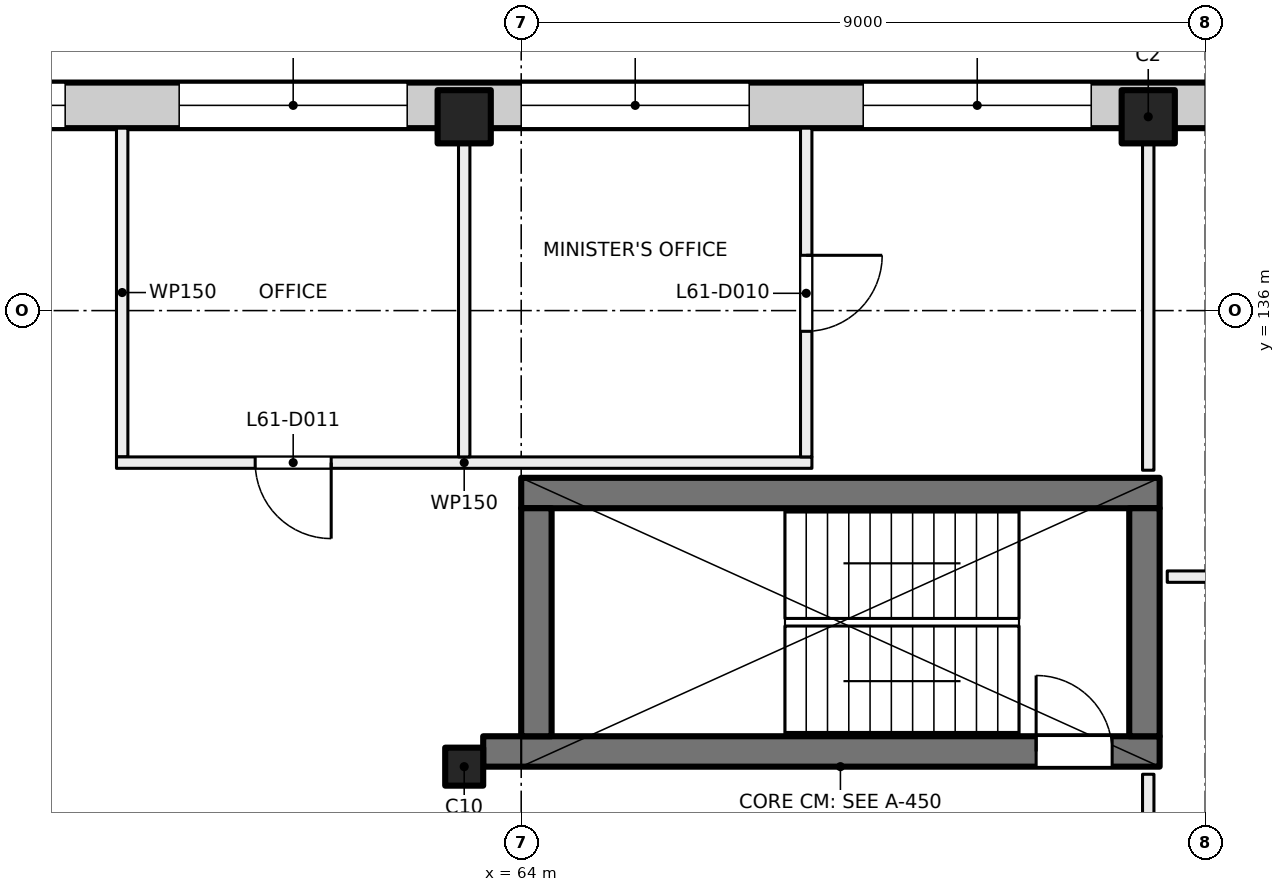
"""IFC4 building model, lengths in metres.
Left out: names, types, materials, properties, quantities, classifications, styles, units other than length and angle.
Written with IfcOpenShell. Run it as: python <this file> out.ifc"""

import sys

from ifc_helpers import new_model, si_unit, direction, frame, frame_2d, origin, origin_2d, place, context, subcontext, project, spatial, rectangle, extrude, element, fill, save


model = new_model("IFC4")
c1 = context("Model", 3, precision=1e-05, world=origin(), true_north=direction((0.0, 1.0)))
c2 = subcontext(c1, "Body", "Model", "MODEL_VIEW")
j1 = project(units=[si_unit("LENGTHUNIT", "METRE"), si_unit("PLANEANGLEUNIT", "RADIAN")], contexts=[c1])
p1 = place(None, origin())
s1 = spatial("IfcSite", under=j1, at=p1, CompositionType="ELEMENT")
p2 = place(p1, origin())
s2 = spatial("IfcBuilding", under=s1, at=p2, CompositionType="ELEMENT")
p3 = place(p2, frame((0.0, 0.0, 257.5)))
s3 = spatial("IfcBuildingStorey", under=s2, at=p3, CompositionType="ELEMENT", Elevation=257.5)
p4 = place(p3, frame((63.25, 130.0, 0.0), z_axis=(0.0, 0.0, 1.0), x_axis=(1.0, 0.0, 0.0)))
e1 = element("IfcColumn", 1, at=p4, inside=s3, PredefinedType="COLUMN", context=c2, shape_type="SweptSolid", body=[
    extrude(rectangle(XDim=0.5, YDim=0.5, at=origin_2d()), origin(), (0.0, 0.0, 1.0), 4.0),
])
for number, where, z_axis, x_axis in (
    (2, (63.25, 138.55, 0.0), (0.0, 0.0, 1.0), (1.0, 0.0, 0.0)),
    (3, (72.25, 138.55, 0.0), (0.0, 0.0, 1.0), (1.0, 0.0, 0.0)),
):
    element("IfcColumn", number, at=place(p3, frame(where, z_axis=z_axis, x_axis=x_axis)), inside=s3, PredefinedType="COLUMN", context=c2, shape_type="SweptSolid", body=[
        extrude(rectangle(XDim=0.7, YDim=0.7, at=origin_2d()), origin(), (0.0, 0.0, 1.0), 4.0),
    ])
p5 = place(p3, frame((63.5, 130.2, 0.0), z_axis=(0.0, 0.0, 1.0), x_axis=(1.0, 0.0, 0.0)))
e4 = element("IfcWall", 4, at=p5, inside=s3, PredefinedType="SHEAR", context=c2, shape_type="SweptSolid", body=[
    extrude(rectangle(XDim=8.9, YDim=0.4, at=frame_2d((4.45, 0.0))), origin(), (0.0, 0.0, 1.0), 4.0),
])
p6 = place(p5, frame((7.275, 0.0, 0.0)))
e5 = element("IfcOpeningElement", 5, at=p6, cuts=e4, PredefinedType="OPENING", context=c2, shape_type="SweptSolid", body=[
    extrude(rectangle(XDim=1.0, YDim=2.1, at=frame_2d((0.5, 1.05))), frame((0.0, 0.21, 0.0), z_axis=(0.0, -1.0, 0.0), x_axis=(1.0, 0.0, 0.0)), (0.0, 0.0, 1.0), 0.42),
])
p7 = place(p3, frame((64.0, 133.6, 0.0), z_axis=(0.0, 0.0, 1.0), x_axis=(1.0, 0.0, 0.0)))
e6 = element("IfcWall", 6, at=p7, inside=s3, PredefinedType="SHEAR", context=c2, shape_type="SweptSolid", body=[
    extrude(rectangle(XDim=8.4, YDim=0.4, at=frame_2d((4.2, 0.0))), origin(), (0.0, 0.0, 1.0), 4.0),
])
for number, where, z_axis, x_axis in (
    (7, (64.2, 130.4, 0.0), (0.0, 0.0, 1.0), (0.0, 1.0, 0.0)),
    (8, (72.2, 130.4, 0.0), (0.0, 0.0, 1.0), (0.0, 1.0, 0.0)),
):
    element("IfcWall", number, at=place(p3, frame(where, z_axis=z_axis, x_axis=x_axis)), inside=s3, PredefinedType="SHEAR", context=c2, shape_type="SweptSolid", body=[
        extrude(rectangle(XDim=3.0, YDim=0.4, at=frame_2d((1.5, 0.0))), origin(), (0.0, 0.0, 1.0), 4.0),
    ])
p8 = place(p3, frame((47.07, 138.7, 0.0), z_axis=(0.0, 0.0, 1.0), x_axis=(1.0, 0.0, 0.0)))
e9 = element("IfcWall", 9, at=p8, inside=s3, PredefinedType="SOLIDWALL", context=c2, shape_type="SweptSolid", body=[
    extrude(rectangle(XDim=43.91, YDim=0.6, at=frame_2d((21.955, 0.0))), origin(), (0.0, 0.0, 1.0), 3.625),
])
p9 = place(p8, frame((3.43, 0.0, 0.9)))
e10 = element("IfcOpeningElement", 10, at=p9, cuts=e9, PredefinedType="OPENING", context=c2, shape_type="SweptSolid", body=[
    extrude(rectangle(XDim=3.0, YDim=2.4, at=frame_2d((1.5, 1.2))), frame((0.0, 0.31, 0.0), z_axis=(0.0, -1.0, 0.0), x_axis=(1.0, 0.0, 0.0)), (0.0, 0.0, 1.0), 0.62),
])
p10 = place(p8, frame((7.93, 0.0, 0.9)))
e11 = element("IfcOpeningElement", 11, at=p10, cuts=e9, PredefinedType="OPENING", context=c2, shape_type="SweptSolid", body=[
    extrude(rectangle(XDim=3.0, YDim=2.4, at=frame_2d((1.5, 1.2))), frame((0.0, 0.31, 0.0), z_axis=(0.0, -1.0, 0.0), x_axis=(1.0, 0.0, 0.0)), (0.0, 0.0, 1.0), 0.62),
])
p11 = place(p8, frame((12.43, 0.0, 0.9)))
e12 = element("IfcOpeningElement", 12, at=p11, cuts=e9, PredefinedType="OPENING", context=c2, shape_type="SweptSolid", body=[
    extrude(rectangle(XDim=3.0, YDim=2.4, at=frame_2d((1.5, 1.2))), frame((0.0, 0.31, 0.0), z_axis=(0.0, -1.0, 0.0), x_axis=(1.0, 0.0, 0.0)), (0.0, 0.0, 1.0), 0.62),
])
p12 = place(p8, frame((16.93, 0.0, 0.9)))
e13 = element("IfcOpeningElement", 13, at=p12, cuts=e9, PredefinedType="OPENING", context=c2, shape_type="SweptSolid", body=[
    extrude(rectangle(XDim=3.0, YDim=2.4, at=frame_2d((1.5, 1.2))), frame((0.0, 0.31, 0.0), z_axis=(0.0, -1.0, 0.0), x_axis=(1.0, 0.0, 0.0)), (0.0, 0.0, 1.0), 0.62),
])
p13 = place(p8, frame((21.43, 0.0, 0.9)))
e14 = element("IfcOpeningElement", 14, at=p13, cuts=e9, PredefinedType="OPENING", context=c2, shape_type="SweptSolid", body=[
    extrude(rectangle(XDim=3.0, YDim=2.4, at=frame_2d((1.5, 1.2))), frame((0.0, 0.31, 0.0), z_axis=(0.0, -1.0, 0.0), x_axis=(1.0, 0.0, 0.0)), (0.0, 0.0, 1.0), 0.62),
])
p14 = place(p8, frame((25.93, 0.0, 0.9)))
e15 = element("IfcOpeningElement", 15, at=p14, cuts=e9, PredefinedType="OPENING", context=c2, shape_type="SweptSolid", body=[
    extrude(rectangle(XDim=3.0, YDim=2.4, at=frame_2d((1.5, 1.2))), frame((0.0, 0.31, 0.0), z_axis=(0.0, -1.0, 0.0), x_axis=(1.0, 0.0, 0.0)), (0.0, 0.0, 1.0), 0.62),
])
p15 = place(p8, frame((30.43, 0.0, 0.9)))
e16 = element("IfcOpeningElement", 16, at=p15, cuts=e9, PredefinedType="OPENING", context=c2, shape_type="SweptSolid", body=[
    extrude(rectangle(XDim=3.0, YDim=2.4, at=frame_2d((1.5, 1.2))), frame((0.0, 0.31, 0.0), z_axis=(0.0, -1.0, 0.0), x_axis=(1.0, 0.0, 0.0)), (0.0, 0.0, 1.0), 0.62),
])
p16 = place(p8, frame((34.93, 0.0, 0.9)))
e17 = element("IfcOpeningElement", 17, at=p16, cuts=e9, PredefinedType="OPENING", context=c2, shape_type="SweptSolid", body=[
    extrude(rectangle(XDim=3.0, YDim=2.4, at=frame_2d((1.5, 1.2))), frame((0.0, 0.31, 0.0), z_axis=(0.0, -1.0, 0.0), x_axis=(1.0, 0.0, 0.0)), (0.0, 0.0, 1.0), 0.62),
])
p17 = place(p8, frame((39.43, 0.0, 0.9)))
e18 = element("IfcOpeningElement", 18, at=p17, cuts=e9, PredefinedType="OPENING", context=c2, shape_type="SweptSolid", body=[
    extrude(rectangle(XDim=3.0, YDim=2.4, at=frame_2d((1.5, 1.2))), frame((0.0, 0.31, 0.0), z_axis=(0.0, -1.0, 0.0), x_axis=(1.0, 0.0, 0.0)), (0.0, 0.0, 1.0), 0.62),
])
p18 = place(p3, frame((58.75, 134.075, 0.0), z_axis=(0.0, 0.0, 1.0), x_axis=(0.0, 1.0, 0.0)))
e19 = element("IfcWall", 19, at=p18, inside=s3, PredefinedType="PARTITIONING", context=c2, shape_type="SweptSolid", body=[
    extrude(rectangle(XDim=4.325, YDim=0.15, at=frame_2d((2.163, 0.0))), origin(), (0.0, 0.0, 1.0), 3.625),
])
p19 = place(p3, frame((67.825, 134.0, 0.0), z_axis=(0.0, 0.0, 1.0), x_axis=(-1.0, 0.0, 0.0)))
e20 = element("IfcWall", 20, at=p19, inside=s3, PredefinedType="PARTITIONING", context=c2, shape_type="SweptSolid", body=[
    extrude(rectangle(XDim=9.15, YDim=0.15, at=frame_2d((4.575, 0.0))), origin(), (0.0, 0.0, 1.0), 3.625),
])
p20 = place(p19, frame((6.325, 0.0, 0.0)))
e21 = element("IfcOpeningElement", 21, at=p20, cuts=e20, PredefinedType="OPENING", context=c2, shape_type="SweptSolid", body=[
    extrude(rectangle(XDim=1.0, YDim=2.1, at=frame_2d((0.5, 1.05))), frame((0.0, 0.085, 0.0), z_axis=(0.0, -1.0, 0.0), x_axis=(1.0, 0.0, 0.0)), (0.0, 0.0, 1.0), 0.17),
])
p21 = place(p3, frame((63.25, 134.075, 0.0), z_axis=(0.0, 0.0, 1.0), x_axis=(0.0, 1.0, 0.0)))
e22 = element("IfcWall", 22, at=p21, inside=s3, PredefinedType="PARTITIONING", context=c2, shape_type="SweptSolid", body=[
    extrude(rectangle(XDim=4.325, YDim=0.15, at=frame_2d((2.163, 0.0))), origin(), (0.0, 0.0, 1.0), 3.625),
])
p22 = place(p3, frame((67.75, 138.4, 0.0), z_axis=(0.0, 0.0, 1.0), x_axis=(0.0, -1.0, 0.0)))
e23 = element("IfcWall", 23, at=p22, inside=s3, PredefinedType="PARTITIONING", context=c2, shape_type="SweptSolid", body=[
    extrude(rectangle(XDim=4.325, YDim=0.15, at=frame_2d((2.163, 0.0))), origin(), (0.0, 0.0, 1.0), 3.625),
])
p23 = place(p22, frame((1.673, 0.0, 0.0)))
e24 = element("IfcOpeningElement", 24, at=p23, cuts=e23, PredefinedType="OPENING", context=c2, shape_type="SweptSolid", body=[
    extrude(rectangle(XDim=1.0, YDim=2.1, at=frame_2d((0.5, 1.05))), frame((0.0, 0.085, 0.0), z_axis=(0.0, -1.0, 0.0), x_axis=(1.0, 0.0, 0.0)), (0.0, 0.0, 1.0), 0.17),
])
p24 = place(p3, frame((72.25, 126.0, 0.0), z_axis=(0.0, 0.0, 1.0), x_axis=(0.0, 1.0, 0.0)))
e25 = element("IfcWall", 25, at=p24, inside=s3, PredefinedType="PARTITIONING", context=c2, shape_type="SweptSolid", body=[
    extrude(rectangle(XDim=3.9, YDim=0.15, at=frame_2d((1.95, 0.0))), origin(), (0.0, 0.0, 1.0), 3.625),
])
p25 = place(p3, frame((72.25, 133.9, 0.0), z_axis=(0.0, 0.0, 1.0), x_axis=(0.0, 1.0, 0.0)))
e26 = element("IfcWall", 26, at=p25, inside=s3, PredefinedType="PARTITIONING", context=c2, shape_type="SweptSolid", body=[
    extrude(rectangle(XDim=4.5, YDim=0.15, at=frame_2d((2.25, 0.0))), origin(), (0.0, 0.0, 1.0), 3.625),
])
p26 = place(p3, frame((81.325, 132.5, 0.0), z_axis=(0.0, 0.0, 1.0), x_axis=(-1.0, 0.0, 0.0)))
e27 = element("IfcWall", 27, at=p26, inside=s3, PredefinedType="PARTITIONING", context=c2, shape_type="SweptSolid", body=[
    extrude(rectangle(XDim=8.825, YDim=0.15, at=frame_2d((4.413, 0.0))), origin(), (0.0, 0.0, 1.0), 3.625),
])
p27 = place(p26, frame((6.2, 0.0, 0.0)))
e28 = element("IfcOpeningElement", 28, at=p27, cuts=e27, PredefinedType="OPENING", context=c2, shape_type="SweptSolid", body=[
    extrude(rectangle(XDim=1.0, YDim=2.1, at=frame_2d((0.5, 1.05))), frame((0.0, 0.085, 0.0), z_axis=(0.0, -1.0, 0.0), x_axis=(1.0, 0.0, 0.0)), (0.0, 0.0, 1.0), 0.17),
])
p28 = place(p10, origin())
e29 = element("IfcWindow", 29, at=p28, inside=s3, PartitioningType="SINGLE_PANEL", PredefinedType="WINDOW", context=c2, shape_type="SweptSolid", body=[
    extrude(rectangle(XDim=3.0, YDim=2.4, at=frame_2d((1.5, 1.2))), frame((0.0, 0.03, 0.0), z_axis=(0.0, -1.0, 0.0), x_axis=(1.0, 0.0, 0.0)), (0.0, 0.0, 1.0), 0.06),
])
fill(e11, e29)
p29 = place(p11, origin())
e30 = element("IfcWindow", 30, at=p29, inside=s3, PartitioningType="SINGLE_PANEL", PredefinedType="WINDOW", context=c2, shape_type="SweptSolid", body=[
    extrude(rectangle(XDim=3.0, YDim=2.4, at=frame_2d((1.5, 1.2))), frame((0.0, 0.03, 0.0), z_axis=(0.0, -1.0, 0.0), x_axis=(1.0, 0.0, 0.0)), (0.0, 0.0, 1.0), 0.06),
])
fill(e12, e30)
p30 = place(p12, origin())
e31 = element("IfcWindow", 31, at=p30, inside=s3, PartitioningType="SINGLE_PANEL", PredefinedType="WINDOW", context=c2, shape_type="SweptSolid", body=[
    extrude(rectangle(XDim=3.0, YDim=2.4, at=frame_2d((1.5, 1.2))), frame((0.0, 0.03, 0.0), z_axis=(0.0, -1.0, 0.0), x_axis=(1.0, 0.0, 0.0)), (0.0, 0.0, 1.0), 0.06),
])
fill(e13, e31)
p31 = place(p13, origin())
e32 = element("IfcWindow", 32, at=p31, inside=s3, PartitioningType="SINGLE_PANEL", PredefinedType="WINDOW", context=c2, shape_type="SweptSolid", body=[
    extrude(rectangle(XDim=3.0, YDim=2.4, at=frame_2d((1.5, 1.2))), frame((0.0, 0.03, 0.0), z_axis=(0.0, -1.0, 0.0), x_axis=(1.0, 0.0, 0.0)), (0.0, 0.0, 1.0), 0.06),
])
fill(e14, e32)
p32 = place(p6, origin())
e33 = element("IfcDoor", 33, at=p32, inside=s3, OperationType="SINGLE_SWING_LEFT", PredefinedType="DOOR", context=c2, shape_type="SweptSolid", body=[
    extrude(rectangle(XDim=1.0, YDim=2.1, at=frame_2d((0.5, 1.05))), frame((0.0, 0.025, 0.0), z_axis=(0.0, -1.0, 0.0), x_axis=(1.0, 0.0, 0.0)), (0.0, 0.0, 1.0), 0.05),
])
fill(e5, e33)
p33 = place(p23, origin())
e34 = element("IfcDoor", 34, at=p33, inside=s3, OperationType="SINGLE_SWING_LEFT", PredefinedType="DOOR", context=c2, shape_type="SweptSolid", body=[
    extrude(rectangle(XDim=1.0, YDim=2.1, at=frame_2d((0.5, 1.05))), frame((0.0, 0.025, 0.0), z_axis=(0.0, -1.0, 0.0), x_axis=(1.0, 0.0, 0.0)), (0.0, 0.0, 1.0), 0.05),
])
fill(e24, e34)
p34 = place(p20, origin())
e35 = element("IfcDoor", 35, at=p34, inside=s3, OperationType="SINGLE_SWING_RIGHT", PredefinedType="DOOR", context=c2, shape_type="SweptSolid", body=[
    extrude(rectangle(XDim=1.0, YDim=2.1, at=frame_2d((0.5, 1.05))), frame((0.0, 0.025, 0.0), z_axis=(0.0, -1.0, 0.0), x_axis=(1.0, 0.0, 0.0)), (0.0, 0.0, 1.0), 0.05),
])
fill(e21, e35)
save(model, sys.argv[1])
